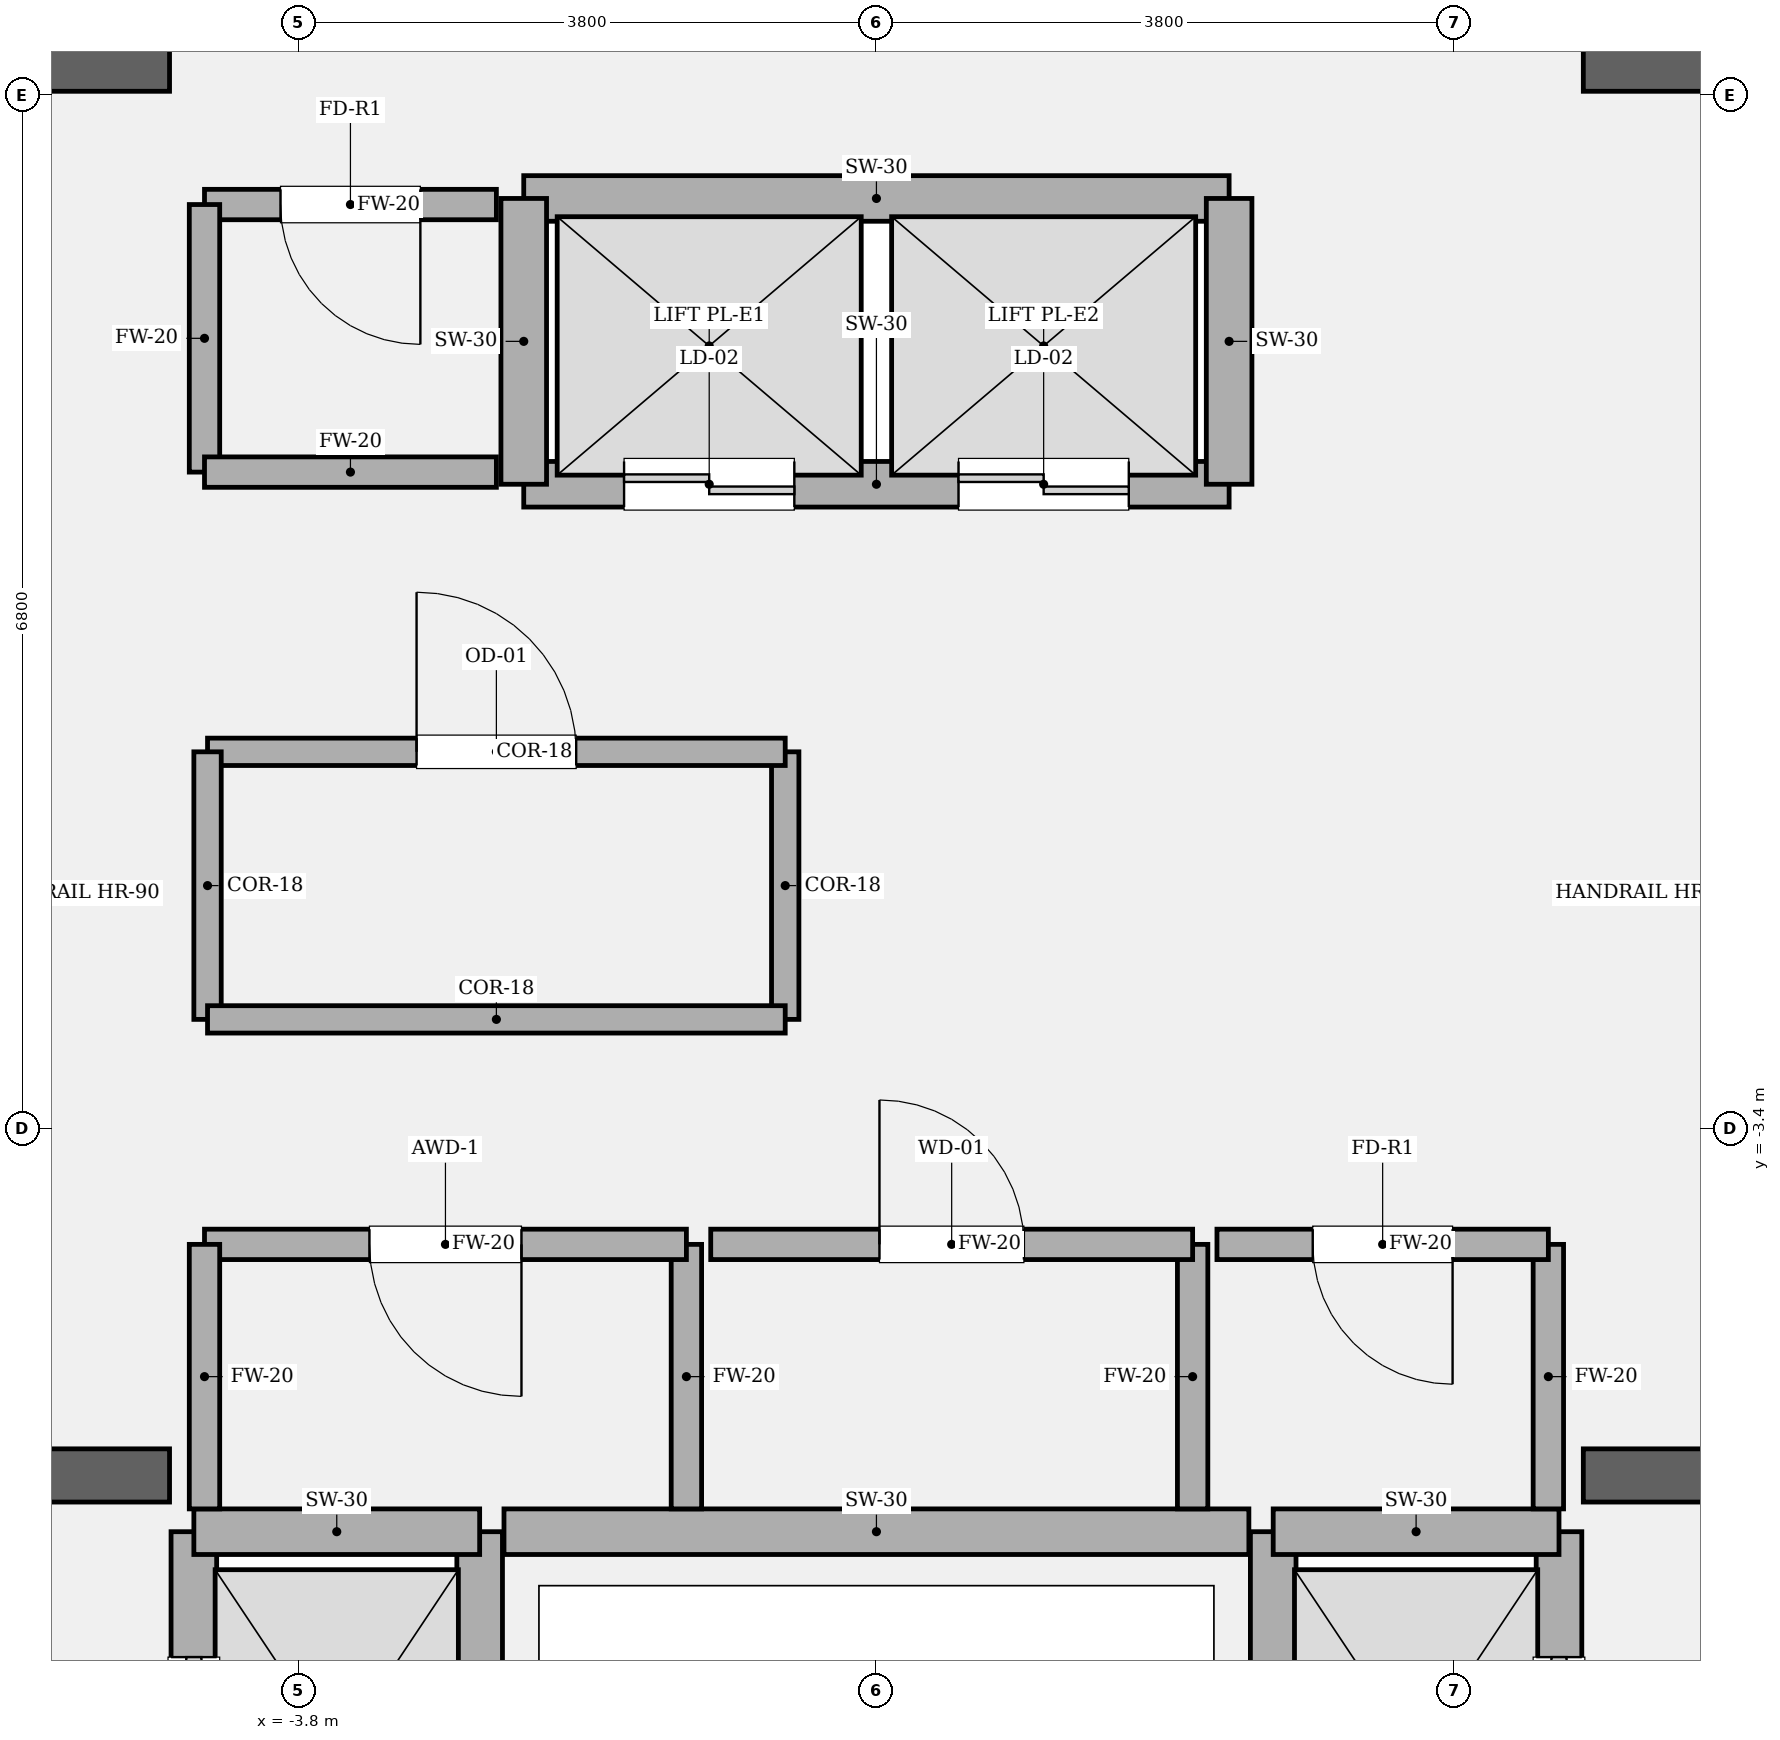
"""IFC4 building model, lengths in metres.
Left out: names, types, materials, properties, quantities, classifications, styles, units other than length and angle.
Written with IfcOpenShell. Run it as: python <this file> out.ifc"""

import sys

from ifc_helpers import new_model, si_unit, direction, frame, frame_2d, origin, place, context, subcontext, project, spatial, rectangle, extrude, element, fill, save


model = new_model("IFC4")
c1 = context("Model", 3, precision=1e-05, world=origin(), true_north=direction((0.0, 1.0)))
c2 = subcontext(c1, "Body", "Model", "MODEL_VIEW")
j1 = project(units=[si_unit("LENGTHUNIT", "METRE"), si_unit("PLANEANGLEUNIT", "RADIAN")], contexts=[c1])
p1 = place(None, origin())
s1 = spatial("IfcSite", under=j1, at=p1, CompositionType="ELEMENT")
p2 = place(p1, origin())
s2 = spatial("IfcBuilding", under=s1, at=p2, CompositionType="ELEMENT")
p3 = place(p2, frame((0.0, 0.0, 325.8)))
s3 = spatial("IfcBuildingStorey", under=s2, at=p3, CompositionType="ELEMENT", Elevation=325.8)
p4 = place(p3, frame((-9.975, -5.68, 0.0), z_axis=(0.0, 0.0, 1.0), x_axis=(1.0, 0.0, 0.0)))
e1 = element("IfcWall", 1, at=p4, inside=s3, PredefinedType="SOLIDWALL", context=c2, shape_type="SweptSolid", body=[
    extrude(rectangle(XDim=5.325, YDim=0.35, at=frame_2d((2.663, 0.0))), origin(), (0.0, 0.0, 1.0), 4.2),
])
p5 = place(p4, frame((1.435, 0.0, 0.0)))
e2 = element("IfcOpeningElement", 2, at=p5, cuts=e1, PredefinedType="OPENING", context=c2, shape_type="SweptSolid", body=[
    extrude(rectangle(XDim=1.18, YDim=2.2, at=frame_2d((0.59, 1.1))), frame((0.0, 0.185, 0.0), z_axis=(0.0, -1.0, 0.0), x_axis=(1.0, 0.0, 0.0)), (0.0, 0.0, 1.0), 0.37),
])
p6 = place(p3, frame((4.65, -5.68, 0.0), z_axis=(0.0, 0.0, 1.0), x_axis=(1.0, 0.0, 0.0)))
e3 = element("IfcWall", 3, at=p6, inside=s3, PredefinedType="SOLIDWALL", context=c2, shape_type="SweptSolid", body=[
    extrude(rectangle(XDim=5.325, YDim=0.35, at=frame_2d((2.663, 0.0))), origin(), (0.0, 0.0, 1.0), 4.2),
])
p7 = place(p6, frame((2.71, 0.0, 0.0)))
e4 = element("IfcOpeningElement", 4, at=p7, cuts=e3, PredefinedType="OPENING", context=c2, shape_type="SweptSolid", body=[
    extrude(rectangle(XDim=1.18, YDim=2.2, at=frame_2d((0.59, 1.1))), frame((0.0, 0.185, 0.0), z_axis=(0.0, -1.0, 0.0), x_axis=(1.0, 0.0, 0.0)), (0.0, 0.0, 1.0), 0.37),
])
for number, where, z_axis, x_axis in (
    (5, (-9.975, 3.6, 0.0), (0.0, 0.0, 1.0), (1.0, 0.0, 0.0)),
    (6, (4.65, 3.6, 0.0), (0.0, 0.0, 1.0), (1.0, 0.0, 0.0)),
):
    element("IfcWall", number, at=place(p3, frame(where, z_axis=z_axis, x_axis=x_axis)), inside=s3, PredefinedType="SOLIDWALL", context=c2, shape_type="SweptSolid", body=[
        extrude(rectangle(XDim=5.325, YDim=0.35, at=frame_2d((2.663, 0.0))), origin(), (0.0, 0.0, 1.0), 4.2),
    ])
p8 = place(p3, frame((-4.49, -8.82, 0.0), z_axis=(0.0, 0.0, 1.0), x_axis=(0.0, 1.0, 0.0)))
e7 = element("IfcWall", 7, at=p8, inside=s3, PredefinedType="SOLIDWALL", context=c2, shape_type="SweptSolid", body=[
    extrude(rectangle(XDim=2.77, YDim=0.3, at=frame_2d((1.385, 0.0))), origin(), (0.0, 0.0, 1.0), 4.0),
])
p9 = place(p8, frame((0.825, 0.0, 0.0)))
e8 = element("IfcOpeningElement", 8, at=p9, cuts=e7, PredefinedType="OPENING", context=c2, shape_type="SweptSolid", body=[
    extrude(rectangle(XDim=1.12, YDim=2.25, at=frame_2d((0.56, 1.125))), frame((0.0, 0.16, 0.0), z_axis=(0.0, -1.0, 0.0), x_axis=(1.0, 0.0, 0.0)), (0.0, 0.0, 1.0), 0.32),
])
p10 = place(p3, frame((-2.61, -8.82, 0.0), z_axis=(0.0, 0.0, 1.0), x_axis=(0.0, 1.0, 0.0)))
e9 = element("IfcWall", 9, at=p10, inside=s3, PredefinedType="SOLIDWALL", context=c2, shape_type="SweptSolid", body=[
    extrude(rectangle(XDim=2.77, YDim=0.3, at=frame_2d((1.385, 0.0))), origin(), (0.0, 0.0, 1.0), 4.0),
])
p11 = place(p3, frame((-4.49, -6.05, 0.0), z_axis=(0.0, 0.0, 1.0), x_axis=(1.0, 0.0, 0.0)))
e10 = element("IfcWall", 10, at=p11, inside=s3, PredefinedType="SOLIDWALL", context=c2, shape_type="SweptSolid", body=[
    extrude(rectangle(XDim=1.88, YDim=0.3, at=frame_2d((0.94, 0.0))), origin(), (0.0, 0.0, 1.0), 4.0),
])
p12 = place(p3, frame((4.49, -8.82, 0.0), z_axis=(0.0, 0.0, 1.0), x_axis=(0.0, 1.0, 0.0)))
e11 = element("IfcWall", 11, at=p12, inside=s3, PredefinedType="SOLIDWALL", context=c2, shape_type="SweptSolid", body=[
    extrude(rectangle(XDim=2.77, YDim=0.3, at=frame_2d((1.385, 0.0))), origin(), (0.0, 0.0, 1.0), 4.0),
])
p13 = place(p12, frame((0.825, 0.0, 0.0)))
e12 = element("IfcOpeningElement", 12, at=p13, cuts=e11, PredefinedType="OPENING", context=c2, shape_type="SweptSolid", body=[
    extrude(rectangle(XDim=1.12, YDim=2.25, at=frame_2d((0.56, 1.125))), frame((0.0, 0.16, 0.0), z_axis=(0.0, -1.0, 0.0), x_axis=(1.0, 0.0, 0.0)), (0.0, 0.0, 1.0), 0.32),
])
p14 = place(p3, frame((2.61, -8.82, 0.0), z_axis=(0.0, 0.0, 1.0), x_axis=(0.0, 1.0, 0.0)))
e13 = element("IfcWall", 13, at=p14, inside=s3, PredefinedType="SOLIDWALL", context=c2, shape_type="SweptSolid", body=[
    extrude(rectangle(XDim=2.77, YDim=0.3, at=frame_2d((1.385, 0.0))), origin(), (0.0, 0.0, 1.0), 4.0),
])
p15 = place(p3, frame((2.61, -6.05, 0.0), z_axis=(0.0, 0.0, 1.0), x_axis=(1.0, 0.0, 0.0)))
e14 = element("IfcWall", 14, at=p15, inside=s3, PredefinedType="SOLIDWALL", context=c2, shape_type="SweptSolid", body=[
    extrude(rectangle(XDim=1.88, YDim=0.3, at=frame_2d((0.94, 0.0))), origin(), (0.0, 0.0, 1.0), 4.0),
])
p16 = place(p3, frame((-2.32, 0.84, 0.0), z_axis=(0.0, 0.0, 1.0), x_axis=(1.0, 0.0, 0.0)))
e15 = element("IfcWall", 15, at=p16, inside=s3, PredefinedType="SOLIDWALL", context=c2, shape_type="SweptSolid", body=[
    extrude(rectangle(XDim=4.64, YDim=0.3, at=frame_2d((2.32, 0.0))), origin(), (0.0, 0.0, 1.0), 4.0),
])
p17 = place(p16, frame((0.66, 0.0, 0.0)))
e16 = element("IfcOpeningElement", 16, at=p17, cuts=e15, PredefinedType="OPENING", context=c2, shape_type="SweptSolid", body=[
    extrude(rectangle(XDim=1.12, YDim=2.25, at=frame_2d((0.56, 1.125))), frame((0.0, 0.16, 0.0), z_axis=(0.0, -1.0, 0.0), x_axis=(1.0, 0.0, 0.0)), (0.0, 0.0, 1.0), 0.32),
])
p18 = place(p16, frame((2.86, 0.0, 0.0)))
e17 = element("IfcOpeningElement", 17, at=p18, cuts=e15, PredefinedType="OPENING", context=c2, shape_type="SweptSolid", body=[
    extrude(rectangle(XDim=1.12, YDim=2.25, at=frame_2d((0.56, 1.125))), frame((0.0, 0.16, 0.0), z_axis=(0.0, -1.0, 0.0), x_axis=(1.0, 0.0, 0.0)), (0.0, 0.0, 1.0), 0.32),
])
p19 = place(p3, frame((-2.32, 2.72, 0.0), z_axis=(0.0, 0.0, 1.0), x_axis=(1.0, 0.0, 0.0)))
e18 = element("IfcWall", 18, at=p19, inside=s3, PredefinedType="SOLIDWALL", context=c2, shape_type="SweptSolid", body=[
    extrude(rectangle(XDim=4.64, YDim=0.3, at=frame_2d((2.32, 0.0))), origin(), (0.0, 0.0, 1.0), 4.0),
])
for number, where, z_axis, x_axis in (
    (19, (-2.32, 0.84, 0.0), (0.0, 0.0, 1.0), (0.0, 1.0, 0.0)),
    (20, (2.32, 0.84, 0.0), (0.0, 0.0, 1.0), (0.0, 1.0, 0.0)),
):
    element("IfcWall", number, at=place(p3, frame(where, z_axis=z_axis, x_axis=x_axis)), inside=s3, PredefinedType="SOLIDWALL", context=c2, shape_type="SweptSolid", body=[
        extrude(rectangle(XDim=1.88, YDim=0.3, at=frame_2d((0.94, 0.0))), origin(), (0.0, 0.0, 1.0), 4.0),
    ])
p20 = place(p3, frame((-2.45, -6.05, 0.0), z_axis=(0.0, 0.0, 1.0), x_axis=(1.0, 0.0, 0.0)))
e21 = element("IfcWall", 21, at=p20, inside=s3, PredefinedType="SOLIDWALL", context=c2, shape_type="SweptSolid", body=[
    extrude(rectangle(XDim=4.9, YDim=0.3, at=frame_2d((2.45, 0.0))), origin(), (0.0, 0.0, 1.0), 4.0),
])
p21 = place(p3, frame((-1.25, -5.9, 0.0), z_axis=(0.0, 0.0, 1.0), x_axis=(0.0, 1.0, 0.0)))
e22 = element("IfcWall", 22, at=p21, inside=s3, PredefinedType="SOLIDWALL", context=c2, shape_type="SweptSolid", body=[
    extrude(rectangle(XDim=1.74, YDim=0.2, at=frame_2d((0.87, 0.0))), origin(), (0.0, 0.0, 1.0), 4.0),
])
p22 = place(p3, frame((-1.25, -4.16, 0.0), z_axis=(0.0, 0.0, 1.0), x_axis=(-1.0, 0.0, 0.0)))
e23 = element("IfcWall", 23, at=p22, inside=s3, PredefinedType="SOLIDWALL", context=c2, shape_type="SweptSolid", body=[
    extrude(rectangle(XDim=3.17, YDim=0.2, at=frame_2d((1.585, 0.0))), origin(), (0.0, 0.0, 1.0), 4.0),
])
p23 = place(p22, frame((1.085, 0.0, 0.0)))
e24 = element("IfcOpeningElement", 24, at=p23, cuts=e23, PredefinedType="OPENING", context=c2, shape_type="SweptSolid", body=[
    extrude(rectangle(XDim=1.0, YDim=2.15, at=frame_2d((0.5, 1.075))), frame((0.0, 0.11, 0.0), z_axis=(0.0, -1.0, 0.0), x_axis=(1.0, 0.0, 0.0)), (0.0, 0.0, 1.0), 0.22),
])
for number, where, z_axis, x_axis in (
    (25, (-4.42, -4.16, 0.0), (0.0, 0.0, 1.0), (0.0, -1.0, 0.0)),
    (26, (2.08, -5.9, 0.0), (0.0, 0.0, 1.0), (0.0, 1.0, 0.0)),
):
    element("IfcWall", number, at=place(p3, frame(where, z_axis=z_axis, x_axis=x_axis)), inside=s3, PredefinedType="SOLIDWALL", context=c2, shape_type="SweptSolid", body=[
        extrude(rectangle(XDim=1.74, YDim=0.2, at=frame_2d((0.87, 0.0))), origin(), (0.0, 0.0, 1.0), 4.0),
    ])
p24 = place(p3, frame((2.08, -4.16, 0.0), z_axis=(0.0, 0.0, 1.0), x_axis=(-1.0, 0.0, 0.0)))
e27 = element("IfcWall", 27, at=p24, inside=s3, PredefinedType="SOLIDWALL", context=c2, shape_type="SweptSolid", body=[
    extrude(rectangle(XDim=3.17, YDim=0.2, at=frame_2d((1.585, 0.0))), origin(), (0.0, 0.0, 1.0), 4.0),
])
p25 = place(p24, frame((1.11, 0.0, 0.0)))
e28 = element("IfcOpeningElement", 28, at=p25, cuts=e27, PredefinedType="OPENING", context=c2, shape_type="SweptSolid", body=[
    extrude(rectangle(XDim=0.95, YDim=2.15, at=frame_2d((0.475, 1.075))), frame((0.0, 0.11, 0.0), z_axis=(0.0, -1.0, 0.0), x_axis=(1.0, 0.0, 0.0)), (0.0, 0.0, 1.0), 0.22),
])
p26 = place(p3, frame((4.42, -5.9, 0.0), z_axis=(0.0, 0.0, 1.0), x_axis=(0.0, 1.0, 0.0)))
e29 = element("IfcWall", 29, at=p26, inside=s3, PredefinedType="SOLIDWALL", context=c2, shape_type="SweptSolid", body=[
    extrude(rectangle(XDim=1.74, YDim=0.2, at=frame_2d((0.87, 0.0))), origin(), (0.0, 0.0, 1.0), 4.0),
])
p27 = place(p3, frame((4.42, -4.16, 0.0), z_axis=(0.0, 0.0, 1.0), x_axis=(-1.0, 0.0, 0.0)))
e30 = element("IfcWall", 30, at=p27, inside=s3, PredefinedType="SOLIDWALL", context=c2, shape_type="SweptSolid", body=[
    extrude(rectangle(XDim=2.18, YDim=0.2, at=frame_2d((1.09, 0.0))), origin(), (0.0, 0.0, 1.0), 4.0),
])
p28 = place(p27, frame((0.63, 0.0, 0.0)))
e31 = element("IfcOpeningElement", 31, at=p28, cuts=e30, PredefinedType="OPENING", context=c2, shape_type="SweptSolid", body=[
    extrude(rectangle(XDim=0.92, YDim=2.1, at=frame_2d((0.46, 1.05))), frame((0.0, 0.11, 0.0), z_axis=(0.0, -1.0, 0.0), x_axis=(1.0, 0.0, 0.0)), (0.0, 0.0, 1.0), 0.22),
])
p29 = place(p3, frame((-0.6, -2.68, 0.0), z_axis=(0.0, 0.0, 1.0), x_axis=(0.0, 1.0, 0.0)))
e32 = element("IfcWall", 32, at=p29, inside=s3, PredefinedType="PARTITIONING", context=c2, shape_type="SweptSolid", body=[
    extrude(rectangle(XDim=1.76, YDim=0.18, at=frame_2d((0.88, 0.0))), origin(), (0.0, 0.0, 1.0), 4.0),
])
p30 = place(p3, frame((-0.6, -0.92, 0.0), z_axis=(0.0, 0.0, 1.0), x_axis=(-1.0, 0.0, 0.0)))
e33 = element("IfcWall", 33, at=p30, inside=s3, PredefinedType="PARTITIONING", context=c2, shape_type="SweptSolid", body=[
    extrude(rectangle(XDim=3.8, YDim=0.18, at=frame_2d((1.9, 0.0))), origin(), (0.0, 0.0, 1.0), 4.0),
])
p31 = place(p30, frame((1.375, 0.0, 0.0)))
e34 = element("IfcOpeningElement", 34, at=p31, cuts=e33, PredefinedType="OPENING", context=c2, shape_type="SweptSolid", body=[
    extrude(rectangle(XDim=1.05, YDim=2.2, at=frame_2d((0.525, 1.1))), frame((0.0, 0.1, 0.0), z_axis=(0.0, -1.0, 0.0), x_axis=(1.0, 0.0, 0.0)), (0.0, 0.0, 1.0), 0.2),
])
p32 = place(p3, frame((-4.4, -0.92, 0.0), z_axis=(0.0, 0.0, 1.0), x_axis=(0.0, -1.0, 0.0)))
e35 = element("IfcWall", 35, at=p32, inside=s3, PredefinedType="PARTITIONING", context=c2, shape_type="SweptSolid", body=[
    extrude(rectangle(XDim=1.76, YDim=0.18, at=frame_2d((0.88, 0.0))), origin(), (0.0, 0.0, 1.0), 4.0),
])
p33 = place(p3, frame((-4.4, -2.68, 0.0), z_axis=(0.0, 0.0, 1.0), x_axis=(1.0, 0.0, 0.0)))
e36 = element("IfcWall", 36, at=p33, inside=s3, PredefinedType="PARTITIONING", context=c2, shape_type="SweptSolid", body=[
    extrude(rectangle(XDim=3.8, YDim=0.18, at=frame_2d((1.9, 0.0))), origin(), (0.0, 0.0, 1.0), 4.0),
])
p34 = place(p3, frame((-2.5, 2.68, 0.0), z_axis=(0.0, 0.0, 1.0), x_axis=(-1.0, 0.0, 0.0)))
e37 = element("IfcWall", 37, at=p34, inside=s3, PredefinedType="SOLIDWALL", context=c2, shape_type="SweptSolid", body=[
    extrude(rectangle(XDim=1.92, YDim=0.2, at=frame_2d((0.96, 0.0))), origin(), (0.0, 0.0, 1.0), 4.0),
])
p35 = place(p34, frame((0.5, 0.0, 0.0)))
e38 = element("IfcOpeningElement", 38, at=p35, cuts=e37, PredefinedType="OPENING", context=c2, shape_type="SweptSolid", body=[
    extrude(rectangle(XDim=0.92, YDim=2.1, at=frame_2d((0.46, 1.05))), frame((0.0, 0.11, 0.0), z_axis=(0.0, -1.0, 0.0), x_axis=(1.0, 0.0, 0.0)), (0.0, 0.0, 1.0), 0.22),
])
p36 = place(p3, frame((-4.42, 2.68, 0.0), z_axis=(0.0, 0.0, 1.0), x_axis=(0.0, -1.0, 0.0)))
e39 = element("IfcWall", 39, at=p36, inside=s3, PredefinedType="SOLIDWALL", context=c2, shape_type="SweptSolid", body=[
    extrude(rectangle(XDim=1.76, YDim=0.2, at=frame_2d((0.88, 0.0))), origin(), (0.0, 0.0, 1.0), 4.0),
])
p37 = place(p3, frame((-4.42, 0.92, 0.0), z_axis=(0.0, 0.0, 1.0), x_axis=(1.0, 0.0, 0.0)))
e40 = element("IfcWall", 40, at=p37, inside=s3, PredefinedType="SOLIDWALL", context=c2, shape_type="SweptSolid", body=[
    extrude(rectangle(XDim=1.92, YDim=0.2, at=frame_2d((0.96, 0.0))), origin(), (0.0, 0.0, 1.0), 4.0),
])
p38 = place(p9, origin())
e41 = element("IfcDoor", 41, at=p38, inside=s3, OperationType="SLIDING_TO_LEFT", PredefinedType="DOOR", context=c2, shape_type="SweptSolid", body=[
    extrude(rectangle(XDim=1.12, YDim=2.25, at=frame_2d((0.56, 1.125))), frame((0.0, 0.025, 0.0), z_axis=(0.0, -1.0, 0.0), x_axis=(1.0, 0.0, 0.0)), (0.0, 0.0, 1.0), 0.05),
])
fill(e8, e41)
p39 = place(p13, origin())
e42 = element("IfcDoor", 42, at=p39, inside=s3, OperationType="SLIDING_TO_RIGHT", PredefinedType="DOOR", context=c2, shape_type="SweptSolid", body=[
    extrude(rectangle(XDim=1.12, YDim=2.25, at=frame_2d((0.56, 1.125))), frame((0.0, 0.025, 0.0), z_axis=(0.0, -1.0, 0.0), x_axis=(1.0, 0.0, 0.0)), (0.0, 0.0, 1.0), 0.05),
])
fill(e12, e42)
p40 = place(p17, origin())
e43 = element("IfcDoor", 43, at=p40, inside=s3, OperationType="DOUBLE_DOOR_SLIDING", PredefinedType="DOOR", context=c2, shape_type="SweptSolid", body=[
    extrude(rectangle(XDim=1.12, YDim=2.25, at=frame_2d((0.56, 1.125))), frame((0.0, 0.025, 0.0), z_axis=(0.0, -1.0, 0.0), x_axis=(1.0, 0.0, 0.0)), (0.0, 0.0, 1.0), 0.05),
])
fill(e16, e43)
p41 = place(p18, origin())
e44 = element("IfcDoor", 44, at=p41, inside=s3, OperationType="DOUBLE_DOOR_SLIDING", PredefinedType="DOOR", context=c2, shape_type="SweptSolid", body=[
    extrude(rectangle(XDim=1.12, YDim=2.25, at=frame_2d((0.56, 1.125))), frame((0.0, 0.025, 0.0), z_axis=(0.0, -1.0, 0.0), x_axis=(1.0, 0.0, 0.0)), (0.0, 0.0, 1.0), 0.05),
])
fill(e17, e44)
p42 = place(p23, origin())
e45 = element("IfcDoor", 45, at=p42, inside=s3, OperationType="SINGLE_SWING_LEFT", PredefinedType="DOOR", context=c2, shape_type="SweptSolid", body=[
    extrude(rectangle(XDim=1.0, YDim=2.15, at=frame_2d((0.5, 1.075))), frame((0.0, 0.025, 0.0), z_axis=(0.0, -1.0, 0.0), x_axis=(1.0, 0.0, 0.0)), (0.0, 0.0, 1.0), 0.05),
])
fill(e24, e45)
p43 = place(p25, origin())
e46 = element("IfcDoor", 46, at=p43, inside=s3, OperationType="SINGLE_SWING_RIGHT", PredefinedType="DOOR", context=c2, shape_type="SweptSolid", body=[
    extrude(rectangle(XDim=0.95, YDim=2.15, at=frame_2d((0.475, 1.075))), frame((0.0, 0.025, 0.0), z_axis=(0.0, -1.0, 0.0), x_axis=(1.0, 0.0, 0.0)), (0.0, 0.0, 1.0), 0.05),
])
fill(e28, e46)
p44 = place(p28, origin())
e47 = element("IfcDoor", 47, at=p44, inside=s3, OperationType="SINGLE_SWING_LEFT", PredefinedType="DOOR", context=c2, shape_type="SweptSolid", body=[
    extrude(rectangle(XDim=0.92, YDim=2.1, at=frame_2d((0.46, 1.05))), frame((0.0, 0.025, 0.0), z_axis=(0.0, -1.0, 0.0), x_axis=(1.0, 0.0, 0.0)), (0.0, 0.0, 1.0), 0.05),
])
fill(e31, e47)
p45 = place(p31, origin())
e48 = element("IfcDoor", 48, at=p45, inside=s3, OperationType="SINGLE_SWING_RIGHT", PredefinedType="DOOR", context=c2, shape_type="SweptSolid", body=[
    extrude(rectangle(XDim=1.05, YDim=2.2, at=frame_2d((0.525, 1.1))), frame((0.0, 0.025, 0.0), z_axis=(0.0, -1.0, 0.0), x_axis=(1.0, 0.0, 0.0)), (0.0, 0.0, 1.0), 0.05),
])
fill(e34, e48)
p46 = place(p35, origin())
e49 = element("IfcDoor", 49, at=p46, inside=s3, OperationType="SINGLE_SWING_LEFT", PredefinedType="DOOR", context=c2, shape_type="SweptSolid", body=[
    extrude(rectangle(XDim=0.92, YDim=2.1, at=frame_2d((0.46, 1.05))), frame((0.0, 0.025, 0.0), z_axis=(0.0, -1.0, 0.0), x_axis=(1.0, 0.0, 0.0)), (0.0, 0.0, 1.0), 0.05),
])
fill(e38, e49)
save(model, sys.argv[1])
